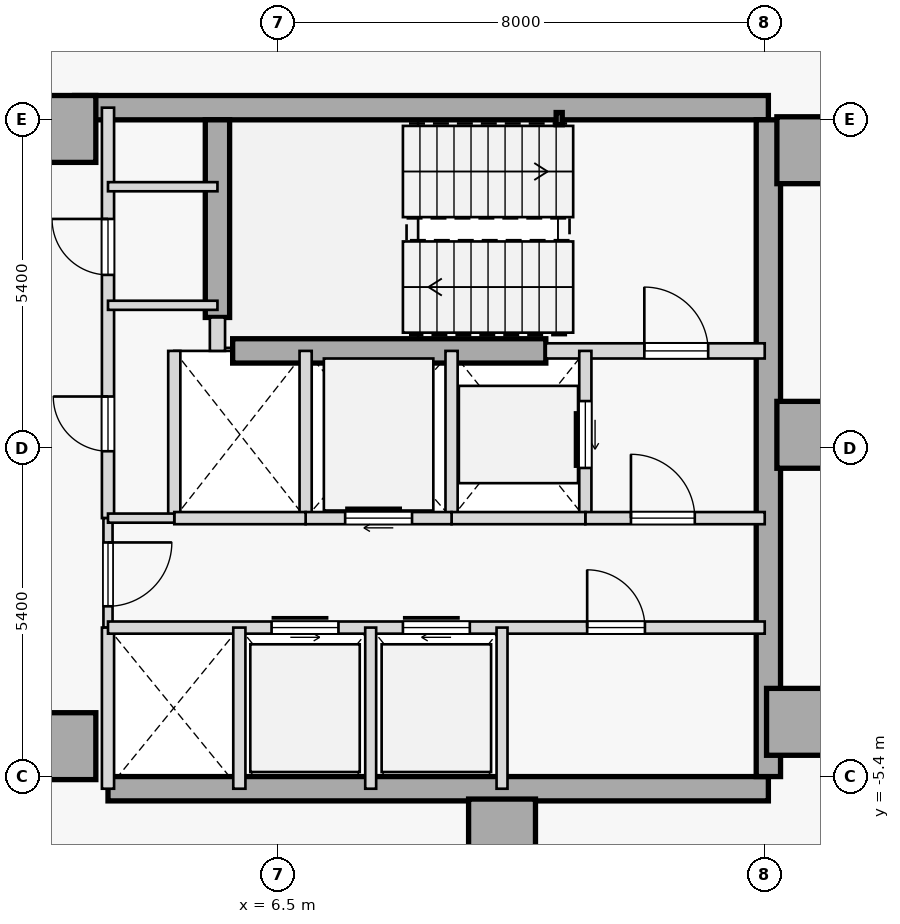
"""IFC4 building model, lengths in metres.
Left out: names, types, materials, properties, quantities, classifications, styles, units other than length and angle.
Written with IfcOpenShell. Run it as: python <this file> out.ifc"""

import sys

from ifc_helpers import new_model, si_unit, direction, frame, frame_2d, origin, origin_2d, place, context, subcontext, project, spatial, rectangle, hollow_rectangle, extrude, element, fill, save


model = new_model("IFC4")
c1 = context("Model", 3, precision=1e-05, world=origin(), true_north=direction((0.0, 1.0)))
c2 = subcontext(c1, "Body", "Model", "MODEL_VIEW")
j1 = project(units=[si_unit("LENGTHUNIT", "METRE"), si_unit("PLANEANGLEUNIT", "RADIAN")], contexts=[c1])
p1 = place(None, origin())
s1 = spatial("IfcSite", under=j1, at=p1, CompositionType="ELEMENT")
p2 = place(p1, origin())
s2 = spatial("IfcBuilding", under=s1, at=p2, CompositionType="ELEMENT")
p3 = place(p2, frame((0.0, 0.0, 120.7)))
s3 = spatial("IfcBuildingStorey", under=s2, at=p3, CompositionType="ELEMENT", Elevation=120.7)
for number, where, z_axis, x_axis in (
    (1, (15.25, 4.9, 0.0), (0.0, 0.0, 1.0), (1.0, 0.0, 0.0)),
    (2, (15.25, 0.22, 0.0), (0.0, 0.0, 1.0), (1.0, 0.0, 0.0)),
    (3, (15.08, -4.5, 0.0), (0.0, 0.0, 1.0), (1.0, 0.0, 0.0)),
    (4, (10.18, -6.32, 0.0), (0.0, 0.0, 1.0), (1.0, 0.0, 0.0)),
    (5, (2.95, -4.9, 0.0), (0.0, 0.0, 1.0), (1.0, 0.0, 0.0)),
    (6, (2.95, 5.25, 0.0), (0.0, 0.0, 1.0), (1.0, 0.0, 0.0)),
):
    element("IfcColumn", number, at=place(p3, frame(where, z_axis=z_axis, x_axis=x_axis)), inside=s3, PredefinedType="COLUMN", context=c2, shape_type="SweptSolid", body=[
        extrude(rectangle(XDim=1.1, YDim=1.1, at=origin_2d()), origin(), (0.0, 0.0, 1.0), 3.7),
    ])
p4 = place(p3, frame((3.15, 5.6, 0.0), z_axis=(0.0, 0.0, 1.0), x_axis=(1.0, 0.0, 0.0)))
e7 = element("IfcWall", 7, at=p4, inside=s3, PredefinedType="SHEAR", context=c2, shape_type="SweptSolid", body=[
    extrude(rectangle(XDim=11.41, YDim=0.4, at=frame_2d((5.705, 0.0))), origin(), (0.0, 0.0, 1.0), 3.475),
])
p5 = place(p3, frame((3.7, -5.6, 0.0), z_axis=(0.0, 0.0, 1.0), x_axis=(1.0, 0.0, 0.0)))
e8 = element("IfcWall", 8, at=p5, inside=s3, PredefinedType="SHEAR", context=c2, shape_type="SweptSolid", body=[
    extrude(rectangle(XDim=10.86, YDim=0.4, at=frame_2d((5.43, 0.0))), origin(), (0.0, 0.0, 1.0), 3.475),
])
p6 = place(p3, frame((14.56, -5.4, 0.0), z_axis=(0.0, 0.0, 1.0), x_axis=(0.0, 1.0, 0.0)))
e9 = element("IfcWall", 9, at=p6, inside=s3, PredefinedType="SHEAR", context=c2, shape_type="SweptSolid", body=[
    extrude(rectangle(XDim=10.8, YDim=0.4, at=frame_2d((5.4, 0.0))), origin(), (0.0, 0.0, 1.0), 3.475),
])
p7 = place(p3, frame((5.5, 2.15, 0.0), z_axis=(0.0, 0.0, 1.0), x_axis=(0.0, 1.0, 0.0)))
e10 = element("IfcWall", 10, at=p7, inside=s3, PredefinedType="SHEAR", context=c2, shape_type="SweptSolid", body=[
    extrude(rectangle(XDim=3.25, YDim=0.4, at=frame_2d((1.625, 0.0))), origin(), (0.0, 0.0, 1.0), 3.475),
])
p8 = place(p3, frame((5.75, 1.6, 0.0), z_axis=(0.0, 0.0, 1.0), x_axis=(1.0, 0.0, 0.0)))
e11 = element("IfcWall", 11, at=p8, inside=s3, PredefinedType="SHEAR", context=c2, shape_type="SweptSolid", body=[
    extrude(rectangle(XDim=5.15, YDim=0.4, at=frame_2d((2.575, 0.0))), origin(), (0.0, 0.0, 1.0), 3.475),
])
p9 = place(p3, frame((11.12, 5.42, 0.0), z_axis=(0.0, 0.0, 1.0), x_axis=(1.0, 0.0, 0.0)))
e12 = element("IfcColumn", 12, at=p9, inside=s3, PredefinedType="COLUMN", context=c2, shape_type="SweptSolid", body=[
    extrude(hollow_rectangle(XDim=0.1, YDim=0.2, WallThickness=0.008, at=origin_2d()), origin(), (0.0, 0.0, 1.0), 3.7),
])
p10 = place(p3, frame((10.9, 1.6, 0.0), z_axis=(0.0, 0.0, 1.0), x_axis=(1.0, 0.0, 0.0)))
e13 = element("IfcWall", 13, at=p10, inside=s3, PredefinedType="STANDARD", context=c2, shape_type="SweptSolid", body=[
    extrude(rectangle(XDim=3.6, YDim=0.25, at=frame_2d((1.8, 0.0))), origin(), (0.0, 0.0, 1.0), 3.475),
])
p11 = place(p10, frame((1.62, 0.0, 0.0)))
e14 = element("IfcOpeningElement", 14, at=p11, cuts=e13, PredefinedType="OPENING", context=c2, shape_type="SweptSolid", body=[
    extrude(rectangle(XDim=1.05, YDim=2.15, at=frame_2d((0.525, 1.075))), frame((0.0, 0.135, 0.0), z_axis=(0.0, -1.0, 0.0), x_axis=(1.0, 0.0, 0.0)), (0.0, 0.0, 1.0), 0.27),
])
p12 = place(p3, frame((5.5, 1.6, 0.0), z_axis=(0.0, 0.0, 1.0), x_axis=(0.0, 1.0, 0.0)))
e15 = element("IfcWall", 15, at=p12, inside=s3, PredefinedType="STANDARD", context=c2, shape_type="SweptSolid", body=[
    extrude(rectangle(XDim=0.55, YDim=0.25, at=frame_2d((0.275, 0.0))), origin(), (0.0, 0.0, 1.0), 3.475),
])
p13 = place(p3, frame((3.7, -1.15, 0.0), z_axis=(0.0, 0.0, 1.0), x_axis=(0.0, 1.0, 0.0)))
e16 = element("IfcWall", 16, at=p13, inside=s3, PredefinedType="STANDARD", context=c2, shape_type="SweptSolid", body=[
    extrude(rectangle(XDim=6.75, YDim=0.2, at=frame_2d((3.375, 0.0))), origin(), (0.0, 0.0, 1.0), 3.475),
])
p14 = place(p13, frame((1.1, 0.0, 0.0)))
e17 = element("IfcOpeningElement", 17, at=p14, cuts=e16, PredefinedType="OPENING", context=c2, shape_type="SweptSolid", body=[
    extrude(rectangle(XDim=0.9, YDim=2.15, at=frame_2d((0.45, 1.075))), frame((0.0, 0.11, 0.0), z_axis=(0.0, -1.0, 0.0), x_axis=(1.0, 0.0, 0.0)), (0.0, 0.0, 1.0), 0.22),
])
p15 = place(p13, frame((4.0, 0.0, 0.0)))
e18 = element("IfcOpeningElement", 18, at=p15, cuts=e16, PredefinedType="OPENING", context=c2, shape_type="SweptSolid", body=[
    extrude(rectangle(XDim=0.92, YDim=2.15, at=frame_2d((0.46, 1.075))), frame((0.0, 0.11, 0.0), z_axis=(0.0, -1.0, 0.0), x_axis=(1.0, 0.0, 0.0)), (0.0, 0.0, 1.0), 0.22),
])
p16 = place(p3, frame((3.7, -2.95, 0.0), z_axis=(0.0, 0.0, 1.0), x_axis=(0.0, 1.0, 0.0)))
e19 = element("IfcWall", 19, at=p16, inside=s3, PredefinedType="PARTITIONING", context=c2, shape_type="SweptSolid", body=[
    extrude(rectangle(XDim=1.8, YDim=0.15, at=frame_2d((0.9, 0.0))), origin(), (0.0, 0.0, 1.0), 3.475),
])
p17 = place(p16, frame((0.35, 0.0, 0.0)))
e20 = element("IfcOpeningElement", 20, at=p17, cuts=e19, PredefinedType="OPENING", context=c2, shape_type="SweptSolid", body=[
    extrude(rectangle(XDim=1.05, YDim=2.18, at=frame_2d((0.525, 1.09))), frame((0.0, 0.085, 0.0), z_axis=(0.0, -1.0, 0.0), x_axis=(1.0, 0.0, 0.0)), (0.0, 0.0, 1.0), 0.17),
])
p18 = place(p3, frame((3.7, -5.6, 0.0), z_axis=(0.0, 0.0, 1.0), x_axis=(0.0, 1.0, 0.0)))
e21 = element("IfcWall", 21, at=p18, inside=s3, PredefinedType="STANDARD", context=c2, shape_type="SweptSolid", body=[
    extrude(rectangle(XDim=2.65, YDim=0.2, at=frame_2d((1.325, 0.0))), origin(), (0.0, 0.0, 1.0), 3.475),
])
p19 = place(p3, frame((11.55, -1.15, 0.0), z_axis=(0.0, 0.0, 1.0), x_axis=(0.0, 1.0, 0.0)))
e22 = element("IfcWall", 22, at=p19, inside=s3, PredefinedType="STANDARD", context=c2, shape_type="SweptSolid", body=[
    extrude(rectangle(XDim=2.75, YDim=0.2, at=frame_2d((1.375, 0.0))), origin(), (0.0, 0.0, 1.0), 3.475),
])
p20 = place(p19, frame((0.825, 0.0, 0.0)))
e23 = element("IfcOpeningElement", 23, at=p20, cuts=e22, PredefinedType="OPENING", context=c2, shape_type="SweptSolid", body=[
    extrude(rectangle(XDim=1.1, YDim=2.15, at=frame_2d((0.55, 1.075))), frame((0.0, 0.11, 0.0), z_axis=(0.0, -1.0, 0.0), x_axis=(1.0, 0.0, 0.0)), (0.0, 0.0, 1.0), 0.22),
])
p21 = place(p3, frame((9.35, -1.15, 0.0), z_axis=(0.0, 0.0, 1.0), x_axis=(0.0, 1.0, 0.0)))
e24 = element("IfcWall", 24, at=p21, inside=s3, PredefinedType="STANDARD", context=c2, shape_type="SweptSolid", body=[
    extrude(rectangle(XDim=2.75, YDim=0.2, at=frame_2d((1.375, 0.0))), origin(), (0.0, 0.0, 1.0), 3.475),
])
p22 = place(p3, frame((11.55, -1.15, 0.0), z_axis=(0.0, 0.0, 1.0), x_axis=(1.0, 0.0, 0.0)))
e25 = element("IfcWall", 25, at=p22, inside=s3, PredefinedType="STANDARD", context=c2, shape_type="SweptSolid", body=[
    extrude(rectangle(XDim=2.95, YDim=0.2, at=frame_2d((1.475, 0.0))), origin(), (0.0, 0.0, 1.0), 3.475),
])
p23 = place(p22, frame((0.75, 0.0, 0.0)))
e26 = element("IfcOpeningElement", 26, at=p23, cuts=e25, PredefinedType="OPENING", context=c2, shape_type="SweptSolid", body=[
    extrude(rectangle(XDim=1.05, YDim=2.18, at=frame_2d((0.525, 1.09))), frame((0.0, 0.11, 0.0), z_axis=(0.0, -1.0, 0.0), x_axis=(1.0, 0.0, 0.0)), (0.0, 0.0, 1.0), 0.22),
])
p24 = place(p3, frame((9.35, -1.15, 0.0), z_axis=(0.0, 0.0, 1.0), x_axis=(1.0, 0.0, 0.0)))
e27 = element("IfcWall", 27, at=p24, inside=s3, PredefinedType="STANDARD", context=c2, shape_type="SweptSolid", body=[
    extrude(rectangle(XDim=2.2, YDim=0.2, at=frame_2d((1.1, 0.0))), origin(), (0.0, 0.0, 1.0), 3.475),
])
p25 = place(p3, frame((6.95, -1.15, 0.0), z_axis=(0.0, 0.0, 1.0), x_axis=(0.0, 1.0, 0.0)))
e28 = element("IfcWall", 28, at=p25, inside=s3, PredefinedType="STANDARD", context=c2, shape_type="SweptSolid", body=[
    extrude(rectangle(XDim=2.75, YDim=0.2, at=frame_2d((1.375, 0.0))), origin(), (0.0, 0.0, 1.0), 3.475),
])
p26 = place(p3, frame((6.95, -1.15, 0.0), z_axis=(0.0, 0.0, 1.0), x_axis=(1.0, 0.0, 0.0)))
e29 = element("IfcWall", 29, at=p26, inside=s3, PredefinedType="STANDARD", context=c2, shape_type="SweptSolid", body=[
    extrude(rectangle(XDim=2.4, YDim=0.2, at=frame_2d((1.2, 0.0))), origin(), (0.0, 0.0, 1.0), 3.475),
])
p27 = place(p26, frame((0.65, 0.0, 0.0)))
e30 = element("IfcOpeningElement", 30, at=p27, cuts=e29, PredefinedType="OPENING", context=c2, shape_type="SweptSolid", body=[
    extrude(rectangle(XDim=1.1, YDim=2.15, at=frame_2d((0.55, 1.075))), frame((0.0, 0.11, 0.0), z_axis=(0.0, -1.0, 0.0), x_axis=(1.0, 0.0, 0.0)), (0.0, 0.0, 1.0), 0.22),
])
p28 = place(p3, frame((4.79, -1.15, 0.0), z_axis=(0.0, 0.0, 1.0), x_axis=(0.0, 1.0, 0.0)))
e31 = element("IfcWall", 31, at=p28, inside=s3, PredefinedType="STANDARD", context=c2, shape_type="SweptSolid", body=[
    extrude(rectangle(XDim=2.75, YDim=0.2, at=frame_2d((1.375, 0.0))), origin(), (0.0, 0.0, 1.0), 3.475),
])
p29 = place(p3, frame((4.79, -1.15, 0.0), z_axis=(0.0, 0.0, 1.0), x_axis=(1.0, 0.0, 0.0)))
e32 = element("IfcWall", 32, at=p29, inside=s3, PredefinedType="STANDARD", context=c2, shape_type="SweptSolid", body=[
    extrude(rectangle(XDim=2.16, YDim=0.2, at=frame_2d((1.08, 0.0))), origin(), (0.0, 0.0, 1.0), 3.475),
])
p30 = place(p3, frame((3.7, -1.15, 0.0), z_axis=(0.0, 0.0, 1.0), x_axis=(1.0, 0.0, 0.0)))
e33 = element("IfcWall", 33, at=p30, inside=s3, PredefinedType="PARTITIONING", context=c2, shape_type="SweptSolid", body=[
    extrude(rectangle(XDim=1.09, YDim=0.15, at=frame_2d((0.545, 0.0))), origin(), (0.0, 0.0, 1.0), 3.475),
])
p31 = place(p3, frame((3.7, -2.95, 0.0), z_axis=(0.0, 0.0, 1.0), x_axis=(1.0, 0.0, 0.0)))
e34 = element("IfcWall", 34, at=p31, inside=s3, PredefinedType="STANDARD", context=c2, shape_type="SweptSolid", body=[
    extrude(rectangle(XDim=10.8, YDim=0.2, at=frame_2d((5.4, 0.0))), origin(), (0.0, 0.0, 1.0), 3.475),
])
p32 = place(p31, frame((2.69, 0.0, 0.0)))
e35 = element("IfcOpeningElement", 35, at=p32, cuts=e34, PredefinedType="OPENING", context=c2, shape_type="SweptSolid", body=[
    extrude(rectangle(XDim=1.1, YDim=2.15, at=frame_2d((0.55, 1.075))), frame((0.0, 0.11, 0.0), z_axis=(0.0, -1.0, 0.0), x_axis=(1.0, 0.0, 0.0)), (0.0, 0.0, 1.0), 0.22),
])
p33 = place(p31, frame((4.85, 0.0, 0.0)))
e36 = element("IfcOpeningElement", 36, at=p33, cuts=e34, PredefinedType="OPENING", context=c2, shape_type="SweptSolid", body=[
    extrude(rectangle(XDim=1.1, YDim=2.15, at=frame_2d((0.55, 1.075))), frame((0.0, 0.11, 0.0), z_axis=(0.0, -1.0, 0.0), x_axis=(1.0, 0.0, 0.0)), (0.0, 0.0, 1.0), 0.22),
])
p34 = place(p31, frame((7.88, 0.0, 0.0)))
e37 = element("IfcOpeningElement", 37, at=p34, cuts=e34, PredefinedType="OPENING", context=c2, shape_type="SweptSolid", body=[
    extrude(rectangle(XDim=0.95, YDim=2.15, at=frame_2d((0.475, 1.075))), frame((0.0, 0.11, 0.0), z_axis=(0.0, -1.0, 0.0), x_axis=(1.0, 0.0, 0.0)), (0.0, 0.0, 1.0), 0.22),
])
p35 = place(p3, frame((5.86, -5.6, 0.0), z_axis=(0.0, 0.0, 1.0), x_axis=(0.0, 1.0, 0.0)))
e38 = element("IfcWall", 38, at=p35, inside=s3, PredefinedType="STANDARD", context=c2, shape_type="SweptSolid", body=[
    extrude(rectangle(XDim=2.65, YDim=0.2, at=frame_2d((1.325, 0.0))), origin(), (0.0, 0.0, 1.0), 3.475),
])
for number, where, z_axis, x_axis in (
    (39, (10.18, -5.6, 0.0), (0.0, 0.0, 1.0), (0.0, 1.0, 0.0)),
    (40, (8.02, -5.6, 0.0), (0.0, 0.0, 1.0), (0.0, 1.0, 0.0)),
):
    element("IfcWall", number, at=place(p3, frame(where, z_axis=z_axis, x_axis=x_axis)), inside=s3, PredefinedType="STANDARD", context=c2, shape_type="SweptSolid", body=[
        extrude(rectangle(XDim=2.65, YDim=0.18, at=frame_2d((1.325, 0.0))), origin(), (0.0, 0.0, 1.0), 3.475),
    ])
for number, where, z_axis, x_axis in (
    (41, (3.7, 4.3, 0.0), (0.0, 0.0, 1.0), (1.0, 0.0, 0.0)),
    (42, (3.7, 2.35, 0.0), (0.0, 0.0, 1.0), (1.0, 0.0, 0.0)),
):
    element("IfcWall", number, at=place(p3, frame(where, z_axis=z_axis, x_axis=x_axis)), inside=s3, PredefinedType="PARTITIONING", context=c2, shape_type="SweptSolid", body=[
        extrude(rectangle(XDim=1.8, YDim=0.15, at=frame_2d((0.9, 0.0))), origin(), (0.0, 0.0, 1.0), 3.475),
    ])
p36 = place(p11, origin())
e43 = element("IfcDoor", 43, at=p36, inside=s3, OperationType="SINGLE_SWING_LEFT", PredefinedType="DOOR", context=c2, shape_type="SweptSolid", body=[
    extrude(rectangle(XDim=1.05, YDim=2.15, at=frame_2d((0.525, 1.075))), frame((0.0, 0.025, 0.0), z_axis=(0.0, -1.0, 0.0), x_axis=(1.0, 0.0, 0.0)), (0.0, 0.0, 1.0), 0.05),
])
fill(e14, e43)
p37 = place(p23, origin())
e44 = element("IfcDoor", 44, at=p37, inside=s3, OperationType="SINGLE_SWING_LEFT", PredefinedType="DOOR", context=c2, shape_type="SweptSolid", body=[
    extrude(rectangle(XDim=1.05, YDim=2.18, at=frame_2d((0.525, 1.09))), frame((0.0, 0.025, 0.0), z_axis=(0.0, -1.0, 0.0), x_axis=(1.0, 0.0, 0.0)), (0.0, 0.0, 1.0), 0.05),
])
fill(e26, e44)
p38 = place(p17, frame((1.05, 0.0, 0.0), z_axis=(0.0, 0.0, 1.0), x_axis=(-1.0, 0.0, 0.0)))
e45 = element("IfcDoor", 45, at=p38, inside=s3, OperationType="SINGLE_SWING_RIGHT", PredefinedType="DOOR", context=c2, shape_type="SweptSolid", body=[
    extrude(rectangle(XDim=1.05, YDim=2.18, at=frame_2d((0.525, 1.09))), frame((0.0, 0.025, 0.0), z_axis=(0.0, -1.0, 0.0), x_axis=(1.0, 0.0, 0.0)), (0.0, 0.0, 1.0), 0.05),
])
fill(e20, e45)
p39 = place(p20, origin())
e46 = element("IfcDoor", 46, at=p39, inside=s3, OperationType="SLIDING_TO_RIGHT", PredefinedType="DOOR", context=c2, shape_type="SweptSolid", body=[
    extrude(rectangle(XDim=1.1, YDim=2.15, at=frame_2d((0.55, 1.075))), frame((0.0, 0.025, 0.0), z_axis=(0.0, -1.0, 0.0), x_axis=(1.0, 0.0, 0.0)), (0.0, 0.0, 1.0), 0.05),
])
fill(e23, e46)
p40 = place(p27, origin())
e47 = element("IfcDoor", 47, at=p40, inside=s3, OperationType="SLIDING_TO_RIGHT", PredefinedType="DOOR", context=c2, shape_type="SweptSolid", body=[
    extrude(rectangle(XDim=1.1, YDim=2.15, at=frame_2d((0.55, 1.075))), frame((0.0, 0.025, 0.0), z_axis=(0.0, -1.0, 0.0), x_axis=(1.0, 0.0, 0.0)), (0.0, 0.0, 1.0), 0.05),
])
fill(e30, e47)
p41 = place(p32, origin())
e48 = element("IfcDoor", 48, at=p41, inside=s3, OperationType="SLIDING_TO_LEFT", PredefinedType="DOOR", context=c2, shape_type="SweptSolid", body=[
    extrude(rectangle(XDim=1.1, YDim=2.15, at=frame_2d((0.55, 1.075))), frame((0.0, 0.025, 0.0), z_axis=(0.0, -1.0, 0.0), x_axis=(1.0, 0.0, 0.0)), (0.0, 0.0, 1.0), 0.05),
])
fill(e35, e48)
p42 = place(p33, origin())
e49 = element("IfcDoor", 49, at=p42, inside=s3, OperationType="SLIDING_TO_RIGHT", PredefinedType="DOOR", context=c2, shape_type="SweptSolid", body=[
    extrude(rectangle(XDim=1.1, YDim=2.15, at=frame_2d((0.55, 1.075))), frame((0.0, 0.025, 0.0), z_axis=(0.0, -1.0, 0.0), x_axis=(1.0, 0.0, 0.0)), (0.0, 0.0, 1.0), 0.05),
])
fill(e36, e49)
p43 = place(p34, origin())
e50 = element("IfcDoor", 50, at=p43, inside=s3, OperationType="SINGLE_SWING_LEFT", PredefinedType="DOOR", context=c2, shape_type="SweptSolid", body=[
    extrude(rectangle(XDim=0.95, YDim=2.15, at=frame_2d((0.475, 1.075))), frame((0.0, 0.025, 0.0), z_axis=(0.0, -1.0, 0.0), x_axis=(1.0, 0.0, 0.0)), (0.0, 0.0, 1.0), 0.05),
])
fill(e37, e50)
p44 = place(p14, origin())
e51 = element("IfcDoor", 51, at=p44, inside=s3, OperationType="SINGLE_SWING_RIGHT", PredefinedType="DOOR", context=c2, shape_type="SweptSolid", body=[
    extrude(rectangle(XDim=0.9, YDim=2.15, at=frame_2d((0.45, 1.075))), frame((0.0, 0.025, 0.0), z_axis=(0.0, -1.0, 0.0), x_axis=(1.0, 0.0, 0.0)), (0.0, 0.0, 1.0), 0.05),
])
fill(e17, e51)
p45 = place(p15, origin())
e52 = element("IfcDoor", 52, at=p45, inside=s3, OperationType="SINGLE_SWING_RIGHT", PredefinedType="DOOR", context=c2, shape_type="SweptSolid", body=[
    extrude(rectangle(XDim=0.92, YDim=2.15, at=frame_2d((0.46, 1.075))), frame((0.0, 0.025, 0.0), z_axis=(0.0, -1.0, 0.0), x_axis=(1.0, 0.0, 0.0)), (0.0, 0.0, 1.0), 0.05),
])
fill(e18, e52)
save(model, sys.argv[1])
